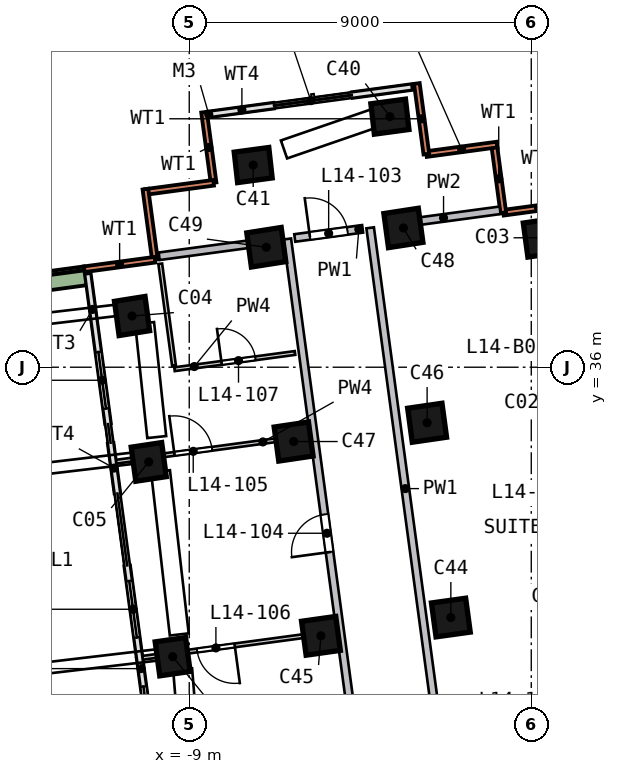
"""IFC4 building model, lengths in metres.
Left out: names, types, materials, properties, quantities, classifications, styles, units other than length and angle.
Written with IfcOpenShell. Run it as: python <this file> out.ifc"""

import sys

from ifc_helpers import new_model, si_unit, direction, frame, frame_2d, origin, origin_2d, place, context, subcontext, project, spatial, rectangle, extrude, element, fill, save


model = new_model("IFC4")
c1 = context("Model", 3, precision=1e-05, world=origin(), true_north=direction((0.0, 1.0)))
c2 = subcontext(c1, "Body", "Model", "MODEL_VIEW")
j1 = project(units=[si_unit("LENGTHUNIT", "METRE"), si_unit("PLANEANGLEUNIT", "RADIAN")], contexts=[c1])
p1 = place(None, origin())
s1 = spatial("IfcSite", under=j1, at=p1, CompositionType="ELEMENT")
p2 = place(p1, origin())
s2 = spatial("IfcBuilding", under=s1, at=p2, CompositionType="ELEMENT")
p3 = place(p2, frame((0.0, 0.0, 64.5)))
s3 = spatial("IfcBuildingStorey", under=s2, at=p3, CompositionType="ELEMENT", Elevation=64.5)
p4 = place(p3, frame((0.461, 39.535, 0.0), z_axis=(-0.169415621, -0.105369167, 0.979895753), x_axis=(-0.147584583, 0.98576925, 0.080484634)))
e1 = element("IfcColumn", 1, at=p4, inside=s3, PredefinedType="COLUMN", context=c2, shape_type="SweptSolid", body=[
    extrude(rectangle(XDim=0.9, YDim=0.8, at=origin_2d()), origin(), (0.0, 0.0, 1.0), 3.255),
])
p5 = place(p3, frame((-10.309, 37.538, 0.0), z_axis=(-0.158802953, -0.15507168, 0.975056099), x_axis=(0.155878874, -0.979139856, -0.130333872)))
e2 = element("IfcColumn", 2, at=p5, inside=s3, PredefinedType="COLUMN", context=c2, shape_type="SweptSolid", body=[
    extrude(rectangle(XDim=0.9, YDim=0.8, at=origin_2d()), origin(), (0.0, 0.0, 1.0), 3.271),
])
p6 = place(p3, frame((-9.886, 33.653, 0.0), z_axis=(-0.147079078, -0.118670344, 0.98198019), x_axis=(0.148753072, -0.984139744, -0.096651377)))
e3 = element("IfcColumn", 3, at=p6, inside=s3, PredefinedType="COLUMN", context=c2, shape_type="SweptSolid", body=[
    extrude(rectangle(XDim=0.9, YDim=0.8, at=origin_2d()), origin(), (0.0, 0.0, 1.0), 3.249),
])
p7 = place(p3, frame((-9.279, 28.481, 0.0), z_axis=(-0.128972189, -0.080711628, 0.988358137), x_axis=(0.142138052, -0.987895303, -0.062126045)))
e4 = element("IfcColumn", 4, at=p7, inside=s3, PredefinedType="COLUMN", context=c2, shape_type="SweptSolid", body=[
    extrude(rectangle(XDim=0.9, YDim=0.8, at=origin_2d()), origin(), (0.0, 0.0, 1.0), 3.228),
])
p8 = place(p3, frame((-3.494, 42.746, 0.0), z_axis=(-0.183390777, -0.1235294, 0.97524782), x_axis=(-0.974001293, -0.111390196, -0.197265571)))
e5 = element("IfcColumn", 5, at=p8, inside=s3, PredefinedType="COLUMN", context=c2, shape_type="SweptSolid", body=[
    extrude(rectangle(XDim=0.9, YDim=0.8, at=origin_2d()), origin(), (0.0, 0.0, 1.0), 3.271),
])
p9 = place(p3, frame((-7.099, 41.493, 0.0), z_axis=(-0.177145733, -0.140165816, 0.974152418), x_axis=(-0.975165795, -0.108694303, -0.19296948)))
e6 = element("IfcColumn", 6, at=p9, inside=s3, PredefinedType="COLUMN", context=c2, shape_type="SweptSolid", body=[
    extrude(rectangle(XDim=0.9, YDim=0.8, at=origin_2d()), origin(), (0.0, 0.0, 1.0), 3.275),
])
p10 = place(p3, frame((-1.954, 29.469, 0.0), z_axis=(-0.134171411, -0.046137995, 0.989883487), x_axis=(-0.137366744, 0.990137583, 0.027530789)))
e7 = element("IfcColumn", 7, at=p10, inside=s3, PredefinedType="COLUMN", context=c2, shape_type="SweptSolid", body=[
    extrude(rectangle(XDim=0.9, YDim=0.9, at=origin_2d()), origin(), (0.0, 0.0, 1.0), 3.223),
])
p11 = place(p3, frame((-5.375, 29.007, 0.0), z_axis=(-0.131748772, -0.062239937, 0.989327272), x_axis=(-0.13924561, 0.989293412, 0.043694461)))
e8 = element("IfcColumn", 8, at=p11, inside=s3, PredefinedType="COLUMN", context=c2, shape_type="SweptSolid", body=[
    extrude(rectangle(XDim=0.9, YDim=0.9, at=origin_2d()), origin(), (0.0, 0.0, 1.0), 3.224),
])
p12 = place(p3, frame((-2.555, 34.642, 0.0), z_axis=(-0.152459252, -0.084481869, 0.984692333), x_axis=(-0.143571109, 0.987663967, 0.062507803)))
e9 = element("IfcColumn", 9, at=p12, inside=s3, PredefinedType="COLUMN", context=c2, shape_type="SweptSolid", body=[
    extrude(rectangle(XDim=0.9, YDim=0.9, at=origin_2d()), origin(), (0.0, 0.0, 1.0), 3.24),
])
p13 = place(p3, frame((-6.071, 34.167, 0.0), z_axis=(-0.149873023, -0.100868835, 0.983546417), x_axis=(-0.145936042, 0.98614293, 0.078897357)))
e10 = element("IfcColumn", 10, at=p13, inside=s3, PredefinedType="COLUMN", context=c2, shape_type="SweptSolid", body=[
    extrude(rectangle(XDim=0.9, YDim=0.9, at=origin_2d()), origin(), (0.0, 0.0, 1.0), 3.243),
])
p14 = place(p3, frame((-3.156, 39.815, 0.0), z_axis=(-0.170178475, -0.122133365, 0.977815283), x_axis=(-0.151004279, 0.983801845, 0.096600404)))
e11 = element("IfcColumn", 11, at=p14, inside=s3, PredefinedType="COLUMN", context=c2, shape_type="SweptSolid", body=[
    extrude(rectangle(XDim=0.9, YDim=0.9, at=origin_2d()), origin(), (0.0, 0.0, 1.0), 3.262),
])
p15 = place(p3, frame((-6.767, 39.328, 0.0), z_axis=(-0.167409229, -0.138798013, 0.976068267), x_axis=(-0.154102973, 0.981554856, 0.113147418)))
e12 = element("IfcColumn", 12, at=p15, inside=s3, PredefinedType="COLUMN", context=c2, shape_type="SweptSolid", body=[
    extrude(rectangle(XDim=0.9, YDim=0.9, at=origin_2d()), origin(), (0.0, 0.0, 1.0), 3.268),
])
p16 = place(p3, frame((1.122, 40.316, 0.0), z_axis=(0.0, 0.0, 1.0), x_axis=(-0.991035813, -0.133596471, 0.0)))
e13 = element("IfcWall", 13, at=p16, inside=s3, PredefinedType="SOLIDWALL", context=c2, shape_type="SweptSolid", body=[
    extrude(rectangle(XDim=1.875, YDim=0.15, at=frame_2d((0.938, 0.0))), origin(), (0.0, 0.0, 1.0), 3.19),
])
p17 = place(p3, frame((-0.736, 40.065, 0.0), z_axis=(0.0, 0.0, 1.0), x_axis=(-0.133745079, 0.991015769, 0.0)))
e14 = element("IfcWall", 14, at=p17, inside=s3, PredefinedType="SOLIDWALL", context=c2, shape_type="SweptSolid", body=[
    extrude(rectangle(XDim=1.8, YDim=0.15, at=frame_2d((0.9, 0.0))), origin(), (0.0, 0.0, 1.0), 3.19),
])
for number, where, z_axis, x_axis in (
    (15, (-0.902, 41.859, 0.0), (0.0, 0.0, 1.0), (-0.991, -0.134, 0.0)),
    (16, (-2.76, 41.609, 0.0), (0.0, 0.0, 1.0), (-0.134, 0.991, 0.0)),
    (17, (-8.61, 42.712, 0.0), (0.0, 0.0, 1.0), (0.134, -0.991, 0.0)),
):
    element("IfcWall", number, at=place(p3, frame(where, z_axis=z_axis, x_axis=x_axis)), inside=s3, PredefinedType="SOLIDWALL", context=c2, shape_type="SweptSolid", body=[
        extrude(rectangle(XDim=1.875, YDim=0.15, at=frame_2d((0.938, 0.0))), origin(), (0.0, 0.0, 1.0), 3.19),
    ])
p18 = place(p3, frame((-8.36, 40.854, 0.0), z_axis=(0.0, 0.0, 1.0), x_axis=(-0.99103616, -0.133593899, 0.0)))
e18 = element("IfcWall", 18, at=p18, inside=s3, PredefinedType="SOLIDWALL", context=c2, shape_type="SweptSolid", body=[
    extrude(rectangle(XDim=1.8, YDim=0.15, at=frame_2d((0.9, 0.0))), origin(), (0.0, 0.0, 1.0), 3.19),
])
for number, where, z_axis, x_axis in (
    (19, (-10.154, 40.687, 0.0), (0.0, 0.0, 1.0), (0.134, -0.991, 0.0)),
    (20, (-9.903, 38.829, 0.0), (0.0, 0.0, 1.0), (-0.991, -0.134, 0.0)),
):
    element("IfcWall", number, at=place(p3, frame(where, z_axis=z_axis, x_axis=x_axis)), inside=s3, PredefinedType="SOLIDWALL", context=c2, shape_type="SweptSolid", body=[
        extrude(rectangle(XDim=1.875, YDim=0.15, at=frame_2d((0.938, 0.0))), origin(), (0.0, 0.0, 1.0), 3.19),
    ])
p19 = place(p3, frame((-3.155, 43.372, 0.0), z_axis=(0.0, 0.0, 1.0), x_axis=(-0.991021438, -0.133703065, 0.0)))
e21 = element("IfcWall", 21, at=p19, inside=s3, PredefinedType="SOLIDWALL", context=c2, shape_type="SweptSolid", body=[
    extrude(rectangle(XDim=1.569, YDim=0.15, at=frame_2d((0.784, 0.0))), origin(), (0.0, 0.0, 1.0), 2.425),
])
p20 = place(p3, frame((-6.782, 42.883, 0.0), z_axis=(0.0, 0.0, 1.0), x_axis=(-0.991040325, -0.133562994, 0.0)))
e22 = element("IfcWall", 22, at=p20, inside=s3, PredefinedType="SOLIDWALL", context=c2, shape_type="SweptSolid", body=[
    extrude(rectangle(XDim=1.68, YDim=0.15, at=frame_2d((0.84, 0.0))), origin(), (0.0, 0.0, 1.0), 2.425),
])
p21 = place(p3, frame((-11.667, 38.445, 0.0), z_axis=(0.0, 0.0, 1.0), x_axis=(0.13367264, -0.991025542, 0.0)))
e23 = element("IfcWall", 23, at=p21, inside=s3, PredefinedType="SOLIDWALL", context=c2, shape_type="SweptSolid", body=[
    extrude(rectangle(XDim=3.963, YDim=0.15, at=frame_2d((1.982, 0.0))), origin(), (0.0, 0.0, 1.0), 2.425),
])
p22 = place(p21, frame((2.063, 0.0, 0.0)))
e24 = element("IfcOpeningElement", 24, at=p22, cuts=e23, PredefinedType="OPENING", context=c2, shape_type="SweptSolid", body=[
    extrude(rectangle(XDim=1.5, YDim=2.4, at=frame_2d((0.75, 1.2))), frame((0.0, 0.085, 0.0), z_axis=(0.0, -1.0, 0.0), x_axis=(1.0, 0.0, 0.0)), (0.0, 0.0, 1.0), 0.17),
])
p23 = place(p3, frame((-10.633, 30.771, 0.0), z_axis=(0.0, 0.0, 1.0), x_axis=(0.133619037, -0.991032771, 0.0)))
e25 = element("IfcWall", 25, at=p23, inside=s3, PredefinedType="SOLIDWALL", context=c2, shape_type="SweptSolid", body=[
    extrude(rectangle(XDim=2.45, YDim=0.15, at=frame_2d((1.225, 0.0))), origin(), (0.0, 0.0, 1.0), 2.425),
])
p24 = place(p23, frame((0.4, 0.0, 0.0)))
e26 = element("IfcOpeningElement", 26, at=p24, cuts=e25, PredefinedType="OPENING", context=c2, shape_type="SweptSolid", body=[
    extrude(rectangle(XDim=1.5, YDim=2.4, at=frame_2d((0.75, 1.2))), frame((0.0, 0.085, 0.0), z_axis=(0.0, -1.0, 0.0), x_axis=(1.0, 0.0, 0.0)), (0.0, 0.0, 1.0), 0.17),
])
p25 = place(p3, frame((-10.305, 28.342, 0.0), z_axis=(0.0, 0.0, 1.0), x_axis=(0.133646714, -0.991029039, 0.0)))
e27 = element("IfcWall", 27, at=p25, inside=s3, PredefinedType="SOLIDWALL", context=c2, shape_type="SweptSolid", body=[
    extrude(rectangle(XDim=2.652, YDim=0.15, at=frame_2d((1.326, 0.0))), origin(), (0.0, 0.0, 1.0), 2.425),
])
p26 = place(p25, frame((0.752, 0.0, 0.0)))
e28 = element("IfcOpeningElement", 28, at=p26, cuts=e27, PredefinedType="OPENING", context=c2, shape_type="SweptSolid", body=[
    extrude(rectangle(XDim=1.5, YDim=2.4, at=frame_2d((0.75, 1.2))), frame((0.0, 0.085, 0.0), z_axis=(0.0, -1.0, 0.0), x_axis=(1.0, 0.0, 0.0)), (0.0, 0.0, 1.0), 0.17),
])
p27 = place(p3, frame((-11.068, 33.998, 0.0), z_axis=(0.0, 0.0, 1.0), x_axis=(0.133740896, -0.991016333, 0.0)))
e29 = element("IfcWall", 29, at=p27, inside=s3, PredefinedType="SOLIDWALL", context=c2, shape_type="SweptSolid", body=[
    extrude(rectangle(XDim=1.318, YDim=0.15, at=frame_2d((0.659, 0.0))), origin(), (0.0, 0.0, 1.0), 2.425),
])
p28 = place(p3, frame((-11.739, 38.405, 0.0), z_axis=(0.0, 0.0, 1.0), x_axis=(-0.991031531, -0.133628231, 0.0)))
e30 = element("IfcWall", 30, at=p28, inside=s3, PredefinedType="SOLIDWALL", context=c2, shape_type="SweptSolid", body=[
    extrude(rectangle(XDim=3.199, YDim=0.5, at=frame_2d((1.6, 0.0))), origin(), (0.0, 0.0, 1.0), 0.7),
])
p29 = place(p3, frame((-14.628, 37.763, 0.0), z_axis=(0.0, 0.0, 1.0), x_axis=(0.133638906, -0.991030092, 0.0)))
e31 = element("IfcWall", 31, at=p29, inside=s3, PredefinedType="SOLIDWALL", context=c2, shape_type="SweptSolid", body=[
    extrude(rectangle(XDim=15.121, YDim=0.5, at=frame_2d((7.561, 0.0))), origin(), (0.0, 0.0, 1.0), 0.7),
])
p30 = place(p3, frame((-6.223, 39.401, 0.0), z_axis=(0.0, 0.0, 1.0), x_axis=(0.991019622, 0.133716523, 0.0)))
e32 = element("IfcWall", 32, at=p30, inside=s3, PredefinedType="SOLIDWALL", context=c2, shape_type="SweptSolid", body=[
    extrude(rectangle(XDim=1.802, YDim=0.2, at=frame_2d((0.901, 0.0))), origin(), (0.0, 0.0, 1.0), 3.19),
])
p31 = place(p30, frame((0.4, 0.0, 0.0)))
e33 = element("IfcOpeningElement", 33, at=p31, cuts=e32, PredefinedType="OPENING", context=c2, shape_type="SweptSolid", body=[
    extrude(rectangle(XDim=1.0, YDim=2.1, at=frame_2d((0.5, 1.05))), frame((0.0, 0.11, 0.0), z_axis=(0.0, -1.0, 0.0), x_axis=(1.0, 0.0, 0.0)), (0.0, 0.0, 1.0), 0.22),
])
p32 = place(p3, frame((-3.49, 17.65, 0.0), z_axis=(0.0, 0.0, 1.0), x_axis=(-0.133647408, 0.991028945, 0.0)))
e34 = element("IfcWall", 34, at=p32, inside=s3, PredefinedType="SOLIDWALL", context=c2, shape_type="SweptSolid", body=[
    extrude(rectangle(XDim=21.921, YDim=0.2, at=frame_2d((10.96, 0.0))), origin(), (0.0, 0.0, 1.0), 3.19),
])
p33 = place(p32, frame((13.607, 0.0, 0.0)))
e35 = element("IfcOpeningElement", 35, at=p33, cuts=e34, PredefinedType="OPENING", context=c2, shape_type="SweptSolid", body=[
    extrude(rectangle(XDim=1.0, YDim=2.1, at=frame_2d((0.5, 1.05))), frame((0.0, 0.11, 0.0), z_axis=(0.0, -1.0, 0.0), x_axis=(1.0, 0.0, 0.0)), (0.0, 0.0, 1.0), 0.22),
])
p34 = place(p3, frame((-4.239, 39.668, 0.0), z_axis=(0.0, 0.0, 1.0), x_axis=(0.133637945, -0.991030221, 0.0)))
e36 = element("IfcWall", 36, at=p34, inside=s3, PredefinedType="SOLIDWALL", context=c2, shape_type="SweptSolid", body=[
    extrude(rectangle(XDim=21.921, YDim=0.2, at=frame_2d((10.96, 0.0))), origin(), (0.0, 0.0, 1.0), 3.19),
])
p35 = place(p34, frame((14.05, 0.0, 0.0)))
e37 = element("IfcOpeningElement", 37, at=p35, cuts=e36, PredefinedType="OPENING", context=c2, shape_type="SweptSolid", body=[
    extrude(rectangle(XDim=1.0, YDim=2.1, at=frame_2d((0.5, 1.05))), frame((0.0, 0.11, 0.0), z_axis=(0.0, -1.0, 0.0), x_axis=(1.0, 0.0, 0.0)), (0.0, 0.0, 1.0), 0.22),
])
p36 = place(p3, frame((-6.616, 39.348, 0.0), z_axis=(0.0, 0.0, 1.0), x_axis=(-0.991028471, -0.133650926, 0.0)))
e38 = element("IfcWall", 38, at=p36, inside=s3, PredefinedType="SOLIDWALL", context=c2, shape_type="SweptSolid", body=[
    extrude(rectangle(XDim=3.204, YDim=0.2, at=frame_2d((1.602, 0.0))), origin(), (0.0, 0.0, 1.0), 3.19),
])
p37 = place(p3, frame((-0.82, 40.13, 0.0), z_axis=(0.0, 0.0, 1.0), x_axis=(-0.991026518, -0.133665403, 0.0)))
e39 = element("IfcWall", 39, at=p37, inside=s3, PredefinedType="SOLIDWALL", context=c2, shape_type="SweptSolid", body=[
    extrude(rectangle(XDim=3.003, YDim=0.2, at=frame_2d((1.501, 0.0))), origin(), (0.0, 0.0, 1.0), 3.19),
])
p38 = place(p3, frame((-9.762, 38.722, 0.0), z_axis=(0.0, 0.0, 1.0), x_axis=(0.133644289, -0.991029366, 0.0)))
e40 = element("IfcWall", 40, at=p38, inside=s3, PredefinedType="PARTITIONING", context=c2, shape_type="SweptSolid", body=[
    extrude(rectangle(XDim=2.7, YDim=0.1, at=frame_2d((1.35, 0.0))), origin(), (0.0, 0.0, 1.0), 3.19),
])
p39 = place(p3, frame((-10.927, 33.513, 0.0), z_axis=(0.0, 0.0, 1.0), x_axis=(0.991031751, 0.133626604, 0.0)))
e41 = element("IfcWall", 41, at=p39, inside=s3, PredefinedType="PARTITIONING", context=c2, shape_type="SweptSolid", body=[
    extrude(rectangle(XDim=5.05, YDim=0.1, at=frame_2d((2.525, 0.0))), origin(), (0.0, 0.0, 1.0), 3.19),
])
p40 = place(p39, frame((1.55, 0.0, 0.0)))
e42 = element("IfcOpeningElement", 42, at=p40, cuts=e41, PredefinedType="OPENING", context=c2, shape_type="SweptSolid", body=[
    extrude(rectangle(XDim=1.0, YDim=2.1, at=frame_2d((0.5, 1.05))), frame((0.0, 0.06, 0.0), z_axis=(0.0, -1.0, 0.0), x_axis=(1.0, 0.0, 0.0)), (0.0, 0.0, 1.0), 0.12),
])
p41 = place(p3, frame((-9.388, 35.947, 0.0), z_axis=(0.0, 0.0, 1.0), x_axis=(0.991026877, 0.133662747, 0.0)))
e43 = element("IfcWall", 43, at=p41, inside=s3, PredefinedType="PARTITIONING", context=c2, shape_type="SweptSolid", body=[
    extrude(rectangle(XDim=3.2, YDim=0.1, at=frame_2d((1.6, 0.0))), origin(), (0.0, 0.0, 1.0), 3.19),
])
p42 = place(p41, frame((1.25, 0.0, 0.0)))
e44 = element("IfcOpeningElement", 44, at=p42, cuts=e43, PredefinedType="OPENING", context=c2, shape_type="SweptSolid", body=[
    extrude(rectangle(XDim=0.9, YDim=2.1, at=frame_2d((0.45, 1.05))), frame((0.0, 0.06, 0.0), z_axis=(0.0, -1.0, 0.0), x_axis=(1.0, 0.0, 0.0)), (0.0, 0.0, 1.0), 0.12),
])
p43 = place(p3, frame((-5.226, 29.027, 0.0), z_axis=(0.0, 0.0, 1.0), x_axis=(-0.991025347, -0.133674086, 0.0)))
e45 = element("IfcWall", 45, at=p43, inside=s3, PredefinedType="PARTITIONING", context=c2, shape_type="SweptSolid", body=[
    extrude(rectangle(XDim=5.05, YDim=0.1, at=frame_2d((2.525, 0.0))), origin(), (0.0, 0.0, 1.0), 3.19),
])
p44 = place(p43, frame((2.6, 0.0, 0.0)))
e46 = element("IfcOpeningElement", 46, at=p44, cuts=e45, PredefinedType="OPENING", context=c2, shape_type="SweptSolid", body=[
    extrude(rectangle(XDim=1.0, YDim=2.1, at=frame_2d((0.5, 1.05))), frame((0.0, 0.06, 0.0), z_axis=(0.0, -1.0, 0.0), x_axis=(1.0, 0.0, 0.0)), (0.0, 0.0, 1.0), 0.12),
])
p45 = place(p22, origin())
e47 = element("IfcDoor", 47, at=p45, inside=s3, OperationType="SLIDING_TO_LEFT", PredefinedType="DOOR", context=c2, shape_type="SweptSolid", body=[
    extrude(rectangle(XDim=1.5, YDim=2.4, at=frame_2d((0.75, 1.2))), frame((0.0, 0.025, 0.0), z_axis=(0.0, -1.0, 0.0), x_axis=(1.0, 0.0, 0.0)), (0.0, 0.0, 1.0), 0.05),
])
fill(e24, e47)
p46 = place(p24, origin())
e48 = element("IfcDoor", 48, at=p46, inside=s3, OperationType="SLIDING_TO_RIGHT", PredefinedType="DOOR", context=c2, shape_type="SweptSolid", body=[
    extrude(rectangle(XDim=1.5, YDim=2.4, at=frame_2d((0.75, 1.2))), frame((0.0, 0.025, 0.0), z_axis=(0.0, -1.0, 0.0), x_axis=(1.0, 0.0, 0.0)), (0.0, 0.0, 1.0), 0.05),
])
fill(e26, e48)
p47 = place(p26, origin())
e49 = element("IfcDoor", 49, at=p47, inside=s3, OperationType="SLIDING_TO_LEFT", PredefinedType="DOOR", context=c2, shape_type="SweptSolid", body=[
    extrude(rectangle(XDim=1.5, YDim=2.4, at=frame_2d((0.75, 1.2))), frame((0.0, 0.025, 0.0), z_axis=(0.0, -1.0, 0.0), x_axis=(1.0, 0.0, 0.0)), (0.0, 0.0, 1.0), 0.05),
])
fill(e28, e49)
p48 = place(p31, origin())
e50 = element("IfcDoor", 50, at=p48, inside=s3, OperationType="SINGLE_SWING_LEFT", PredefinedType="DOOR", context=c2, shape_type="SweptSolid", body=[
    extrude(rectangle(XDim=1.0, YDim=2.1, at=frame_2d((0.5, 1.05))), frame((0.0, 0.025, 0.0), z_axis=(0.0, -1.0, 0.0), x_axis=(1.0, 0.0, 0.0)), (0.0, 0.0, 1.0), 0.05),
])
fill(e33, e50)
p49 = place(p33, origin())
e51 = element("IfcDoor", 51, at=p49, inside=s3, OperationType="SINGLE_SWING_LEFT", PredefinedType="DOOR", context=c2, shape_type="SweptSolid", body=[
    extrude(rectangle(XDim=1.0, YDim=2.1, at=frame_2d((0.5, 1.05))), frame((0.0, 0.025, 0.0), z_axis=(0.0, -1.0, 0.0), x_axis=(1.0, 0.0, 0.0)), (0.0, 0.0, 1.0), 0.05),
])
fill(e35, e51)
p50 = place(p40, origin())
e52 = element("IfcDoor", 52, at=p50, inside=s3, OperationType="SINGLE_SWING_LEFT", PredefinedType="DOOR", context=c2, shape_type="SweptSolid", body=[
    extrude(rectangle(XDim=1.0, YDim=2.1, at=frame_2d((0.5, 1.05))), frame((0.0, 0.025, 0.0), z_axis=(0.0, -1.0, 0.0), x_axis=(1.0, 0.0, 0.0)), (0.0, 0.0, 1.0), 0.05),
])
fill(e42, e52)
p51 = place(p44, origin())
e53 = element("IfcDoor", 53, at=p51, inside=s3, OperationType="SINGLE_SWING_LEFT", PredefinedType="DOOR", context=c2, shape_type="SweptSolid", body=[
    extrude(rectangle(XDim=1.0, YDim=2.1, at=frame_2d((0.5, 1.05))), frame((0.0, 0.025, 0.0), z_axis=(0.0, -1.0, 0.0), x_axis=(1.0, 0.0, 0.0)), (0.0, 0.0, 1.0), 0.05),
])
fill(e46, e53)
p52 = place(p42, origin())
e54 = element("IfcDoor", 54, at=p52, inside=s3, OperationType="SINGLE_SWING_LEFT", PredefinedType="DOOR", context=c2, shape_type="SweptSolid", body=[
    extrude(rectangle(XDim=0.9, YDim=2.1, at=frame_2d((0.45, 1.05))), frame((0.0, 0.025, 0.0), z_axis=(0.0, -1.0, 0.0), x_axis=(1.0, 0.0, 0.0)), (0.0, 0.0, 1.0), 0.05),
])
fill(e44, e54)
save(model, sys.argv[1])
